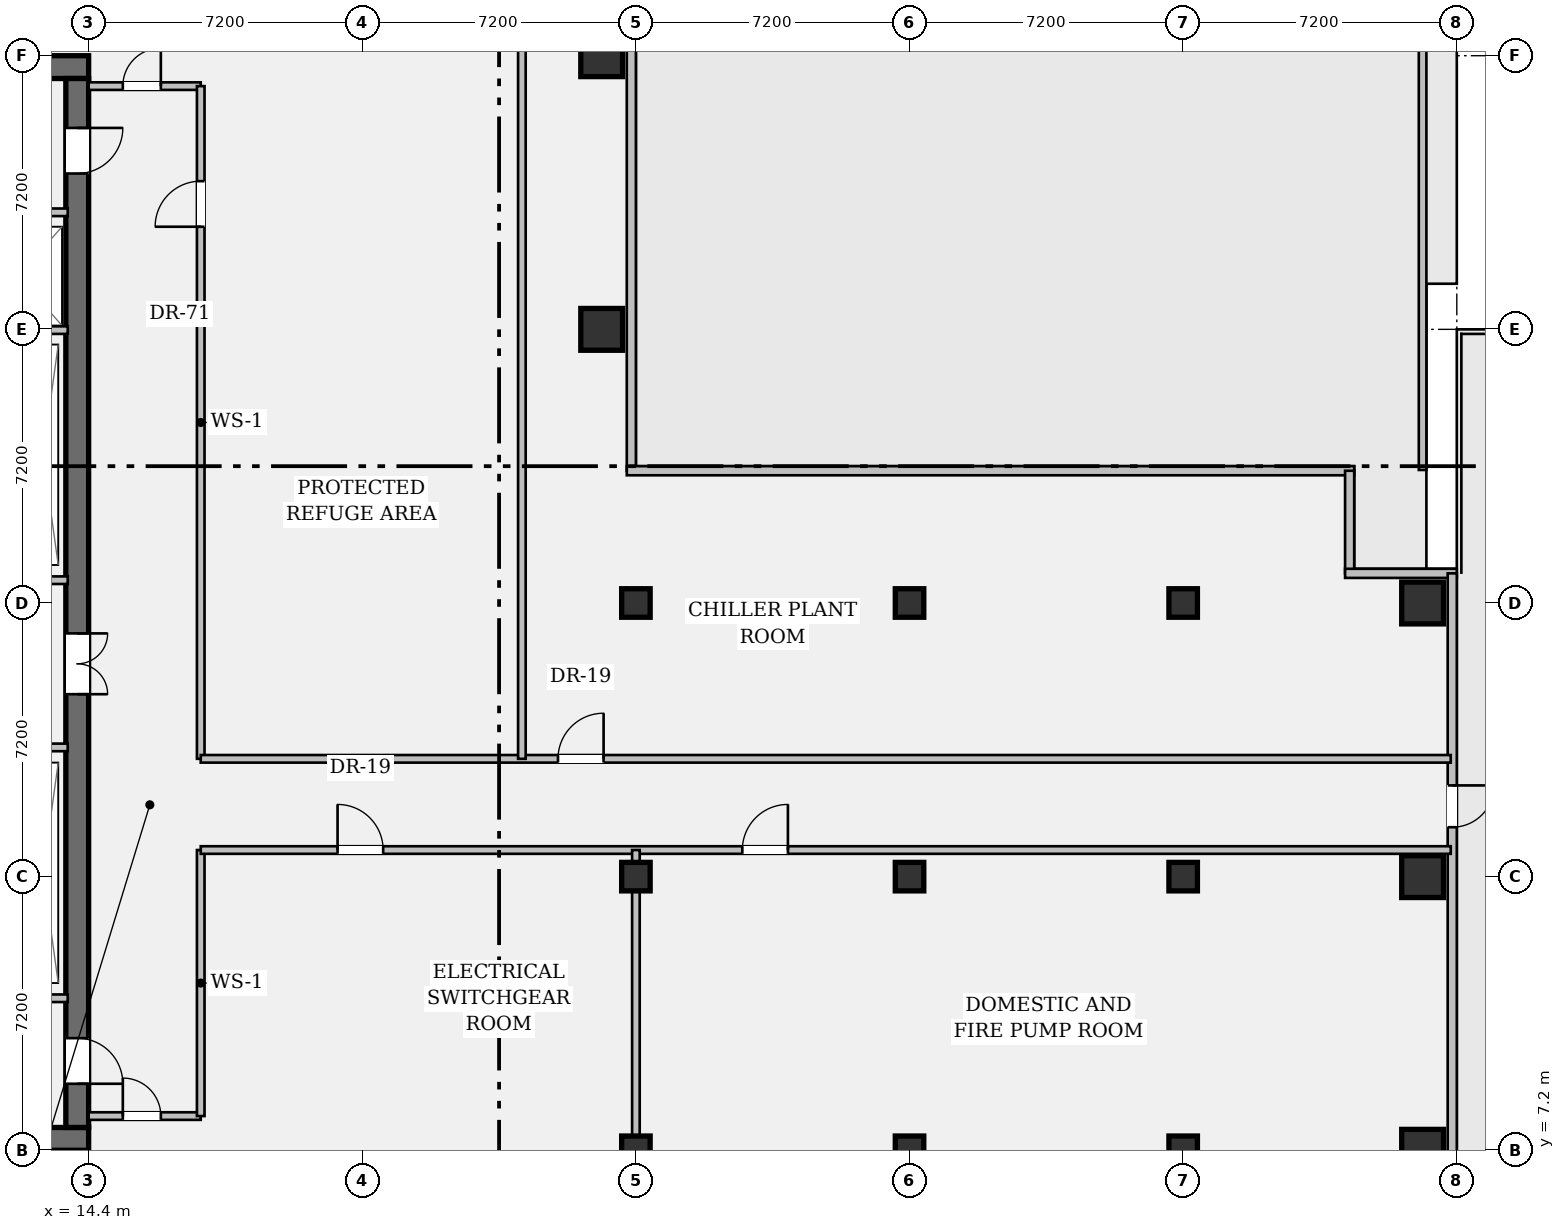
"""IFC4 building model, lengths in metres.
Left out: names, types, materials, properties, quantities, classifications, styles, units other than length and angle.
Written with IfcOpenShell. Run it as: python <this file> out.ifc"""

import sys

from ifc_helpers import new_model, si_unit, direction, frame, frame_2d, origin, origin_2d, place, context, subcontext, project, spatial, rectangle, hollow_rectangle, extrude, element, fill, save


model = new_model("IFC4")
c1 = context("Model", 3, precision=1e-05, world=origin(), true_north=direction((0.0, 1.0)))
c2 = subcontext(c1, "Body", "Model", "MODEL_VIEW")
j1 = project(units=[si_unit("LENGTHUNIT", "METRE"), si_unit("PLANEANGLEUNIT", "RADIAN")], contexts=[c1])
p1 = place(None, origin())
s1 = spatial("IfcSite", under=j1, at=p1, CompositionType="ELEMENT")
p2 = place(p1, origin())
s2 = spatial("IfcBuilding", under=s1, at=p2, CompositionType="ELEMENT")
p3 = place(p2, frame((0.0, 0.0, 26.25)))
s3 = spatial("IfcBuildingStorey", under=s2, at=p3, CompositionType="ELEMENT", Elevation=26.25)
for number, where, z_axis, x_axis in (
    (1, (0.6, 7.5, 0.0), (0.0, 0.0, 1.0), (1.0, 0.0, 0.0)),
    (2, (0.6, 35.7, 0.0), (0.0, 0.0, 1.0), (1.0, 0.0, 0.0)),
):
    element("IfcWall", number, at=place(p3, frame(where, z_axis=z_axis, x_axis=x_axis)), inside=s3, PredefinedType="SHEAR", context=c2, shape_type="SweptSolid", body=[
        extrude(rectangle(XDim=13.8, YDim=0.6, at=frame_2d((6.9, 0.0))), origin(), (0.0, 0.0, 1.0), 4.62),
    ])
p4 = place(p3, frame((14.1, 35.4, 0.0), z_axis=(0.0, 0.0, 1.0), x_axis=(0.0, -1.0, 0.0)))
e3 = element("IfcWall", 3, at=p4, inside=s3, PredefinedType="SHEAR", context=c2, shape_type="SweptSolid", body=[
    extrude(rectangle(XDim=27.6, YDim=0.6, at=frame_2d((13.8, 0.0))), origin(), (0.0, 0.0, 1.0), 4.62),
])
p5 = place(p4, frame((1.3, 0.0, 0.0)))
e4 = element("IfcOpeningElement", 4, at=p5, cuts=e3, PredefinedType="OPENING", context=c2, shape_type="SweptSolid", body=[
    extrude(rectangle(XDim=1.2, YDim=2.15, at=frame_2d((0.6, 1.075))), frame((0.0, 0.312, 0.0), z_axis=(0.0, -1.0, 0.0), x_axis=(1.0, 0.0, 0.0)), (0.0, 0.0, 1.0), 0.624),
])
p6 = place(p4, frame((25.25, 0.0, 0.0)))
e5 = element("IfcOpeningElement", 5, at=p6, cuts=e3, PredefinedType="OPENING", context=c2, shape_type="SweptSolid", body=[
    extrude(rectangle(XDim=1.2, YDim=2.15, at=frame_2d((0.6, 1.075))), frame((0.0, 0.312, 0.0), z_axis=(0.0, -1.0, 0.0), x_axis=(1.0, 0.0, 0.0)), (0.0, 0.0, 1.0), 0.624),
])
p7 = place(p4, frame((14.6, 0.0, 0.0)))
e6 = element("IfcOpeningElement", 6, at=p7, cuts=e3, PredefinedType="OPENING", context=c2, shape_type="SweptSolid", body=[
    extrude(rectangle(XDim=1.6, YDim=2.2, at=frame_2d((0.8, 1.1))), frame((0.0, 0.312, 0.0), z_axis=(0.0, -1.0, 0.0), x_axis=(1.0, 0.0, 0.0)), (0.0, 0.0, 1.0), 0.624),
])
for number, where, z_axis, x_axis in (
    (7, (27.9, 28.8, 0.0), (0.0, 0.0, 1.0), (1.0, 0.0, 0.0)),
    (8, (27.9, 36.0, 0.0), (0.0, 0.0, 1.0), (1.0, 0.0, 0.0)),
):
    element("IfcColumn", number, at=place(p3, frame(where, z_axis=z_axis, x_axis=x_axis)), inside=s3, PredefinedType="COLUMN", context=c2, shape_type="SweptSolid", body=[
        extrude(hollow_rectangle(XDim=1.1, YDim=1.1, WallThickness=0.07, at=origin_2d()), origin(), (0.0, 0.0, 1.0), 4.62),
    ])
for number, where, z_axis, x_axis in (
    (9, (28.8, 7.2, 0.0), (0.0, 0.0, 1.0), (1.0, 0.0, 0.0)),
    (10, (28.8, 14.4, 0.0), (0.0, 0.0, 1.0), (1.0, 0.0, 0.0)),
    (11, (28.8, 21.6, 0.0), (0.0, 0.0, 1.0), (1.0, 0.0, 0.0)),
    (12, (36.0, 7.2, 0.0), (0.0, 0.0, 1.0), (1.0, 0.0, 0.0)),
    (13, (36.0, 14.4, 0.0), (0.0, 0.0, 1.0), (1.0, 0.0, 0.0)),
    (14, (36.0, 21.6, 0.0), (0.0, 0.0, 1.0), (1.0, 0.0, 0.0)),
    (15, (43.2, 7.2, 0.0), (0.0, 0.0, 1.0), (1.0, 0.0, 0.0)),
    (16, (43.2, 14.4, 0.0), (0.0, 0.0, 1.0), (1.0, 0.0, 0.0)),
    (17, (43.2, 21.6, 0.0), (0.0, 0.0, 1.0), (1.0, 0.0, 0.0)),
):
    element("IfcColumn", number, at=place(p3, frame(where, z_axis=z_axis, x_axis=x_axis)), inside=s3, PredefinedType="COLUMN", context=c2, shape_type="SweptSolid", body=[
        extrude(rectangle(XDim=0.75, YDim=0.75, at=origin_2d()), origin(), (0.0, 0.0, 1.0), 4.62),
    ])
for number, where, z_axis, x_axis in (
    (18, (49.5, 7.2, 0.0), (0.0, 0.0, 1.0), (1.0, 0.0, 0.0)),
    (19, (49.5, 14.4, 0.0), (0.0, 0.0, 1.0), (1.0, 0.0, 0.0)),
    (20, (49.5, 21.6, 0.0), (0.0, 0.0, 1.0), (1.0, 0.0, 0.0)),
):
    element("IfcColumn", number, at=place(p3, frame(where, z_axis=z_axis, x_axis=x_axis)), inside=s3, PredefinedType="COLUMN", context=c2, shape_type="SweptSolid", body=[
        extrude(hollow_rectangle(XDim=1.1, YDim=1.1, WallThickness=0.07, at=origin_2d()), origin(), (0.0, 0.0, 1.0), 4.62),
    ])
p8 = place(p3, frame((28.68, 40.38, 0.0), z_axis=(0.0, 0.0, 1.0), x_axis=(0.0, -1.0, 0.0)))
e21 = element("IfcWall", 21, at=p8, inside=s3, PredefinedType="STANDARD", context=c2, shape_type="SweptSolid", body=[
    extrude(rectangle(XDim=15.3, YDim=0.24, at=frame_2d((7.65, 0.0))), origin(), (0.0, 0.0, 1.0), 4.62),
])
p9 = place(p3, frame((28.56, 25.08, 0.0), z_axis=(0.0, 0.0, 1.0), x_axis=(1.0, 0.0, 0.0)))
e22 = element("IfcWall", 22, at=p9, inside=s3, PredefinedType="STANDARD", context=c2, shape_type="SweptSolid", body=[
    extrude(rectangle(XDim=19.14, YDim=0.24, at=frame_2d((9.57, 0.0))), origin(), (0.0, 0.0, 1.0), 4.62),
])
p10 = place(p3, frame((47.58, 25.08, 0.0), z_axis=(0.0, 0.0, 1.0), x_axis=(0.0, -1.0, 0.0)))
e23 = element("IfcWall", 23, at=p10, inside=s3, PredefinedType="STANDARD", context=c2, shape_type="SweptSolid", body=[
    extrude(rectangle(XDim=2.7, YDim=0.24, at=frame_2d((1.35, 0.0))), origin(), (0.0, 0.0, 1.0), 4.62),
])
p11 = place(p3, frame((47.46, 22.38, 0.0), z_axis=(0.0, 0.0, 1.0), x_axis=(1.0, 0.0, 0.0)))
e24 = element("IfcWall", 24, at=p11, inside=s3, PredefinedType="STANDARD", context=c2, shape_type="SweptSolid", body=[
    extrude(rectangle(XDim=2.94, YDim=0.24, at=frame_2d((1.47, 0.0))), origin(), (0.0, 0.0, 1.0), 4.62),
])
p12 = place(p3, frame((50.28, 22.38, 0.0), z_axis=(0.0, 0.0, 1.0), x_axis=(0.0, -1.0, 0.0)))
e25 = element("IfcWall", 25, at=p12, inside=s3, PredefinedType="STANDARD", context=c2, shape_type="SweptSolid", body=[
    extrude(rectangle(XDim=19.56, YDim=0.24, at=frame_2d((9.78, 0.0))), origin(), (0.0, 0.0, 1.0), 4.62),
])
p13 = place(p12, frame((5.58, 0.0, 0.0)))
e26 = element("IfcOpeningElement", 26, at=p13, cuts=e25, PredefinedType="OPENING", context=c2, shape_type="SweptSolid", body=[
    extrude(rectangle(XDim=1.1, YDim=2.15, at=frame_2d((0.55, 1.075))), frame((0.0, 0.132, 0.0), z_axis=(0.0, -1.0, 0.0), x_axis=(1.0, 0.0, 0.0)), (0.0, 0.0, 1.0), 0.264),
])
p14 = place(p3, frame((49.5, 47.7, 0.0), z_axis=(0.0, 0.0, 1.0), x_axis=(0.0, -1.0, 0.0)))
e27 = element("IfcWall", 27, at=p14, inside=s3, PredefinedType="PARAPET", context=c2, shape_type="SweptSolid", body=[
    extrude(rectangle(XDim=22.6, YDim=0.2, at=frame_2d((11.3, 0.0))), origin(), (0.0, 0.0, 1.0), 1.15),
])
p15 = place(p3, frame((8.7, 31.88, 0.0), z_axis=(0.0, 0.0, 1.0), x_axis=(1.0, 0.0, 0.0)))
e28 = element("IfcWall", 28, at=p15, inside=s3, PredefinedType="PARTITIONING", context=c2, shape_type="SweptSolid", body=[
    extrude(rectangle(XDim=5.15, YDim=0.2, at=frame_2d((2.575, 0.0))), origin(), (0.0, 0.0, 1.0), 4.62),
])
p16 = place(p15, frame((0.75, 0.0, 0.0)))
e29 = element("IfcOpeningElement", 29, at=p16, cuts=e28, PredefinedType="OPENING", context=c2, shape_type="SweptSolid", body=[
    extrude(rectangle(XDim=1.2, YDim=2.2, at=frame_2d((0.6, 1.1))), frame((0.0, 0.112, 0.0), z_axis=(0.0, -1.0, 0.0), x_axis=(1.0, 0.0, 0.0)), (0.0, 0.0, 1.0), 0.224),
])
p17 = place(p15, frame((3.25, 0.0, 0.0)))
e30 = element("IfcOpeningElement", 30, at=p17, cuts=e28, PredefinedType="OPENING", context=c2, shape_type="SweptSolid", body=[
    extrude(rectangle(XDim=1.2, YDim=2.2, at=frame_2d((0.6, 1.1))), frame((0.0, 0.112, 0.0), z_axis=(0.0, -1.0, 0.0), x_axis=(1.0, 0.0, 0.0)), (0.0, 0.0, 1.0), 0.224),
])
for number, where, z_axis, x_axis in (
    (31, (8.7, 11.2, 0.0), (0.0, 0.0, 1.0), (1.0, 0.0, 0.0)),
    (32, (8.7, 28.78, 0.0), (0.0, 0.0, 1.0), (1.0, 0.0, 0.0)),
):
    element("IfcWall", number, at=place(p3, frame(where, z_axis=z_axis, x_axis=x_axis)), inside=s3, PredefinedType="PARTITIONING", context=c2, shape_type="SweptSolid", body=[
        extrude(rectangle(XDim=5.15, YDim=0.2, at=frame_2d((2.575, 0.0))), origin(), (0.0, 0.0, 1.0), 4.62),
    ])
for number, where, z_axis, x_axis in (
    (33, (7.1, 22.2, 0.0), (0.0, 0.0, 1.0), (1.0, 0.0, 0.0)),
    (34, (7.1, 17.8, 0.0), (0.0, 0.0, 1.0), (1.0, 0.0, 0.0)),
):
    element("IfcWall", number, at=place(p3, frame(where, z_axis=z_axis, x_axis=x_axis)), inside=s3, PredefinedType="PARTITIONING", context=c2, shape_type="SweptSolid", body=[
        extrude(rectangle(XDim=6.75, YDim=0.2, at=frame_2d((3.375, 0.0))), origin(), (0.0, 0.0, 1.0), 4.62),
    ])
p18 = place(p3, frame((14.4, 8.1, 0.0), z_axis=(0.0, 0.0, 1.0), x_axis=(1.0, 0.0, 0.0)))
e35 = element("IfcWall", 35, at=p18, inside=s3, PredefinedType="PARTITIONING", context=c2, shape_type="SweptSolid", body=[
    extrude(rectangle(XDim=2.95, YDim=0.2, at=frame_2d((1.475, 0.0))), origin(), (0.0, 0.0, 1.0), 3.678),
])
p19 = place(p18, frame((0.9, 0.0, 0.0)))
e36 = element("IfcOpeningElement", 36, at=p19, cuts=e35, PredefinedType="OPENING", context=c2, shape_type="SweptSolid", body=[
    extrude(rectangle(XDim=1.0, YDim=2.15, at=frame_2d((0.5, 1.075))), frame((0.0, 0.112, 0.0), z_axis=(0.0, -1.0, 0.0), x_axis=(1.0, 0.0, 0.0)), (0.0, 0.0, 1.0), 0.224),
])
p20 = place(p3, frame((14.4, 35.2, 0.0), z_axis=(0.0, 0.0, 1.0), x_axis=(1.0, 0.0, 0.0)))
e37 = element("IfcWall", 37, at=p20, inside=s3, PredefinedType="PARTITIONING", context=c2, shape_type="SweptSolid", body=[
    extrude(rectangle(XDim=2.95, YDim=0.2, at=frame_2d((1.475, 0.0))), origin(), (0.0, 0.0, 1.0), 3.678),
])
p21 = place(p20, frame((0.9, 0.0, 0.0)))
e38 = element("IfcOpeningElement", 38, at=p21, cuts=e37, PredefinedType="OPENING", context=c2, shape_type="SweptSolid", body=[
    extrude(rectangle(XDim=1.0, YDim=2.15, at=frame_2d((0.5, 1.075))), frame((0.0, 0.112, 0.0), z_axis=(0.0, -1.0, 0.0), x_axis=(1.0, 0.0, 0.0)), (0.0, 0.0, 1.0), 0.224),
])
p22 = place(p3, frame((17.35, 8.1, 0.0), z_axis=(0.0, 0.0, 1.0), x_axis=(0.0, 1.0, 0.0)))
e39 = element("IfcWall", 39, at=p22, inside=s3, PredefinedType="PARTITIONING", context=c2, shape_type="SweptSolid", body=[
    extrude(rectangle(XDim=7.0, YDim=0.2, at=frame_2d((3.5, 0.0))), origin(), (0.0, 0.0, 1.0), 2.205),
])
p23 = place(p3, frame((17.35, 17.5, 0.0), z_axis=(0.0, 0.0, 1.0), x_axis=(0.0, 1.0, 0.0)))
e40 = element("IfcWall", 40, at=p23, inside=s3, PredefinedType="PARTITIONING", context=c2, shape_type="SweptSolid", body=[
    extrude(rectangle(XDim=17.7, YDim=0.2, at=frame_2d((8.85, 0.0))), origin(), (0.0, 0.0, 1.0), 2.205),
])
p24 = place(p23, frame((14.0, 0.0, 0.0)))
e41 = element("IfcOpeningElement", 41, at=p24, cuts=e40, PredefinedType="OPENING", context=c2, shape_type="SweptSolid", body=[
    extrude(rectangle(XDim=1.2, YDim=2.02, at=frame_2d((0.6, 1.01))), frame((0.0, 0.112, 0.0), z_axis=(0.0, -1.0, 0.0), x_axis=(1.0, 0.0, 0.0)), (0.0, 0.0, 1.0), 0.224),
])
p25 = place(p3, frame((17.35, 15.1, 0.0), z_axis=(0.0, 0.0, 1.0), x_axis=(1.0, 0.0, 0.0)))
e42 = element("IfcWall", 42, at=p25, inside=s3, PredefinedType="PARTITIONING", context=c2, shape_type="SweptSolid", body=[
    extrude(rectangle(XDim=32.89, YDim=0.2, at=frame_2d((16.445, 0.0))), origin(), (0.0, 0.0, 1.0), 3.678),
])
p26 = place(p25, frame((3.6, 0.0, 0.0)))
e43 = element("IfcOpeningElement", 43, at=p26, cuts=e42, PredefinedType="OPENING", context=c2, shape_type="SweptSolid", body=[
    extrude(rectangle(XDim=1.2, YDim=2.15, at=frame_2d((0.6, 1.075))), frame((0.0, 0.112, 0.0), z_axis=(0.0, -1.0, 0.0), x_axis=(1.0, 0.0, 0.0)), (0.0, 0.0, 1.0), 0.224),
])
p27 = place(p25, frame((14.25, 0.0, 0.0)))
e44 = element("IfcOpeningElement", 44, at=p27, cuts=e42, PredefinedType="OPENING", context=c2, shape_type="SweptSolid", body=[
    extrude(rectangle(XDim=1.2, YDim=2.15, at=frame_2d((0.6, 1.075))), frame((0.0, 0.112, 0.0), z_axis=(0.0, -1.0, 0.0), x_axis=(1.0, 0.0, 0.0)), (0.0, 0.0, 1.0), 0.224),
])
p28 = place(p3, frame((17.35, 17.5, 0.0), z_axis=(0.0, 0.0, 1.0), x_axis=(1.0, 0.0, 0.0)))
e45 = element("IfcWall", 45, at=p28, inside=s3, PredefinedType="PARTITIONING", context=c2, shape_type="SweptSolid", body=[
    extrude(rectangle(XDim=32.89, YDim=0.2, at=frame_2d((16.445, 0.0))), origin(), (0.0, 0.0, 1.0), 3.678),
])
p29 = place(p28, frame((9.4, 0.0, 0.0)))
e46 = element("IfcOpeningElement", 46, at=p29, cuts=e45, PredefinedType="OPENING", context=c2, shape_type="SweptSolid", body=[
    extrude(rectangle(XDim=1.2, YDim=2.15, at=frame_2d((0.6, 1.075))), frame((0.0, 0.112, 0.0), z_axis=(0.0, -1.0, 0.0), x_axis=(1.0, 0.0, 0.0)), (0.0, 0.0, 1.0), 0.224),
])
p30 = place(p3, frame((28.8, 0.12, 0.0), z_axis=(0.0, 0.0, 1.0), x_axis=(0.0, 1.0, 0.0)))
e47 = element("IfcWall", 47, at=p30, inside=s3, PredefinedType="PARTITIONING", context=c2, shape_type="SweptSolid", body=[
    extrude(rectangle(XDim=14.98, YDim=0.2, at=frame_2d((7.49, 0.0))), origin(), (0.0, 0.0, 1.0), 3.678),
])
p31 = place(p3, frame((25.8, 17.5, 0.0), z_axis=(0.0, 0.0, 1.0), x_axis=(0.0, 1.0, 0.0)))
e48 = element("IfcWall", 48, at=p31, inside=s3, PredefinedType="PARTITIONING", context=c2, shape_type="SweptSolid", body=[
    extrude(rectangle(XDim=22.73, YDim=0.2, at=frame_2d((11.365, 0.0))), origin(), (0.0, 0.0, 1.0), 2.205),
])
p32 = place(p13, origin())
e49 = element("IfcDoor", 49, at=p32, inside=s3, OperationType="SINGLE_SWING_LEFT", PredefinedType="DOOR", context=c2, shape_type="SweptSolid", body=[
    extrude(rectangle(XDim=1.1, YDim=2.15, at=frame_2d((0.55, 1.075))), frame((0.0, 0.025, 0.0), z_axis=(0.0, -1.0, 0.0), x_axis=(1.0, 0.0, 0.0)), (0.0, 0.0, 1.0), 0.05),
])
fill(e26, e49)
p33 = place(p5, origin())
e50 = element("IfcDoor", 50, at=p33, inside=s3, OperationType="SINGLE_SWING_LEFT", PredefinedType="DOOR", context=c2, shape_type="SweptSolid", body=[
    extrude(rectangle(XDim=1.2, YDim=2.15, at=frame_2d((0.6, 1.075))), frame((0.0, 0.025, 0.0), z_axis=(0.0, -1.0, 0.0), x_axis=(1.0, 0.0, 0.0)), (0.0, 0.0, 1.0), 0.05),
])
fill(e4, e50)
p34 = place(p6, origin())
e51 = element("IfcDoor", 51, at=p34, inside=s3, OperationType="SINGLE_SWING_RIGHT", PredefinedType="DOOR", context=c2, shape_type="SweptSolid", body=[
    extrude(rectangle(XDim=1.2, YDim=2.15, at=frame_2d((0.6, 1.075))), frame((0.0, 0.025, 0.0), z_axis=(0.0, -1.0, 0.0), x_axis=(1.0, 0.0, 0.0)), (0.0, 0.0, 1.0), 0.05),
])
fill(e5, e51)
p35 = place(p7, origin())
e52 = element("IfcDoor", 52, at=p35, inside=s3, OperationType="DOUBLE_DOOR_SINGLE_SWING", PredefinedType="DOOR", context=c2, shape_type="SweptSolid", body=[
    extrude(rectangle(XDim=1.6, YDim=2.2, at=frame_2d((0.8, 1.1))), frame((0.0, 0.025, 0.0), z_axis=(0.0, -1.0, 0.0), x_axis=(1.0, 0.0, 0.0)), (0.0, 0.0, 1.0), 0.05),
])
fill(e6, e52)
p36 = place(p24, origin())
e53 = element("IfcDoor", 53, at=p36, inside=s3, OperationType="SINGLE_SWING_LEFT", PredefinedType="DOOR", context=c2, shape_type="SweptSolid", body=[
    extrude(rectangle(XDim=1.2, YDim=2.02, at=frame_2d((0.6, 1.01))), frame((0.0, 0.025, 0.0), z_axis=(0.0, -1.0, 0.0), x_axis=(1.0, 0.0, 0.0)), (0.0, 0.0, 1.0), 0.05),
])
fill(e41, e53)
p37 = place(p29, origin())
e54 = element("IfcDoor", 54, at=p37, inside=s3, OperationType="SINGLE_SWING_RIGHT", PredefinedType="DOOR", context=c2, shape_type="SweptSolid", body=[
    extrude(rectangle(XDim=1.2, YDim=2.15, at=frame_2d((0.6, 1.075))), frame((0.0, 0.025, 0.0), z_axis=(0.0, -1.0, 0.0), x_axis=(1.0, 0.0, 0.0)), (0.0, 0.0, 1.0), 0.05),
])
fill(e46, e54)
p38 = place(p26, origin())
e55 = element("IfcDoor", 55, at=p38, inside=s3, OperationType="SINGLE_SWING_LEFT", PredefinedType="DOOR", context=c2, shape_type="SweptSolid", body=[
    extrude(rectangle(XDim=1.2, YDim=2.15, at=frame_2d((0.6, 1.075))), frame((0.0, 0.025, 0.0), z_axis=(0.0, -1.0, 0.0), x_axis=(1.0, 0.0, 0.0)), (0.0, 0.0, 1.0), 0.05),
])
fill(e43, e55)
p39 = place(p27, origin())
e56 = element("IfcDoor", 56, at=p39, inside=s3, OperationType="SINGLE_SWING_RIGHT", PredefinedType="DOOR", context=c2, shape_type="SweptSolid", body=[
    extrude(rectangle(XDim=1.2, YDim=2.15, at=frame_2d((0.6, 1.075))), frame((0.0, 0.025, 0.0), z_axis=(0.0, -1.0, 0.0), x_axis=(1.0, 0.0, 0.0)), (0.0, 0.0, 1.0), 0.05),
])
fill(e44, e56)
p40 = place(p21, origin())
e57 = element("IfcDoor", 57, at=p40, inside=s3, OperationType="SINGLE_SWING_RIGHT", PredefinedType="DOOR", context=c2, shape_type="SweptSolid", body=[
    extrude(rectangle(XDim=1.0, YDim=2.15, at=frame_2d((0.5, 1.075))), frame((0.0, 0.025, 0.0), z_axis=(0.0, -1.0, 0.0), x_axis=(1.0, 0.0, 0.0)), (0.0, 0.0, 1.0), 0.05),
])
fill(e38, e57)
p41 = place(p19, origin())
e58 = element("IfcDoor", 58, at=p41, inside=s3, OperationType="SINGLE_SWING_LEFT", PredefinedType="DOOR", context=c2, shape_type="SweptSolid", body=[
    extrude(rectangle(XDim=1.0, YDim=2.15, at=frame_2d((0.5, 1.075))), frame((0.0, 0.025, 0.0), z_axis=(0.0, -1.0, 0.0), x_axis=(1.0, 0.0, 0.0)), (0.0, 0.0, 1.0), 0.05),
])
fill(e36, e58)
save(model, sys.argv[1])
